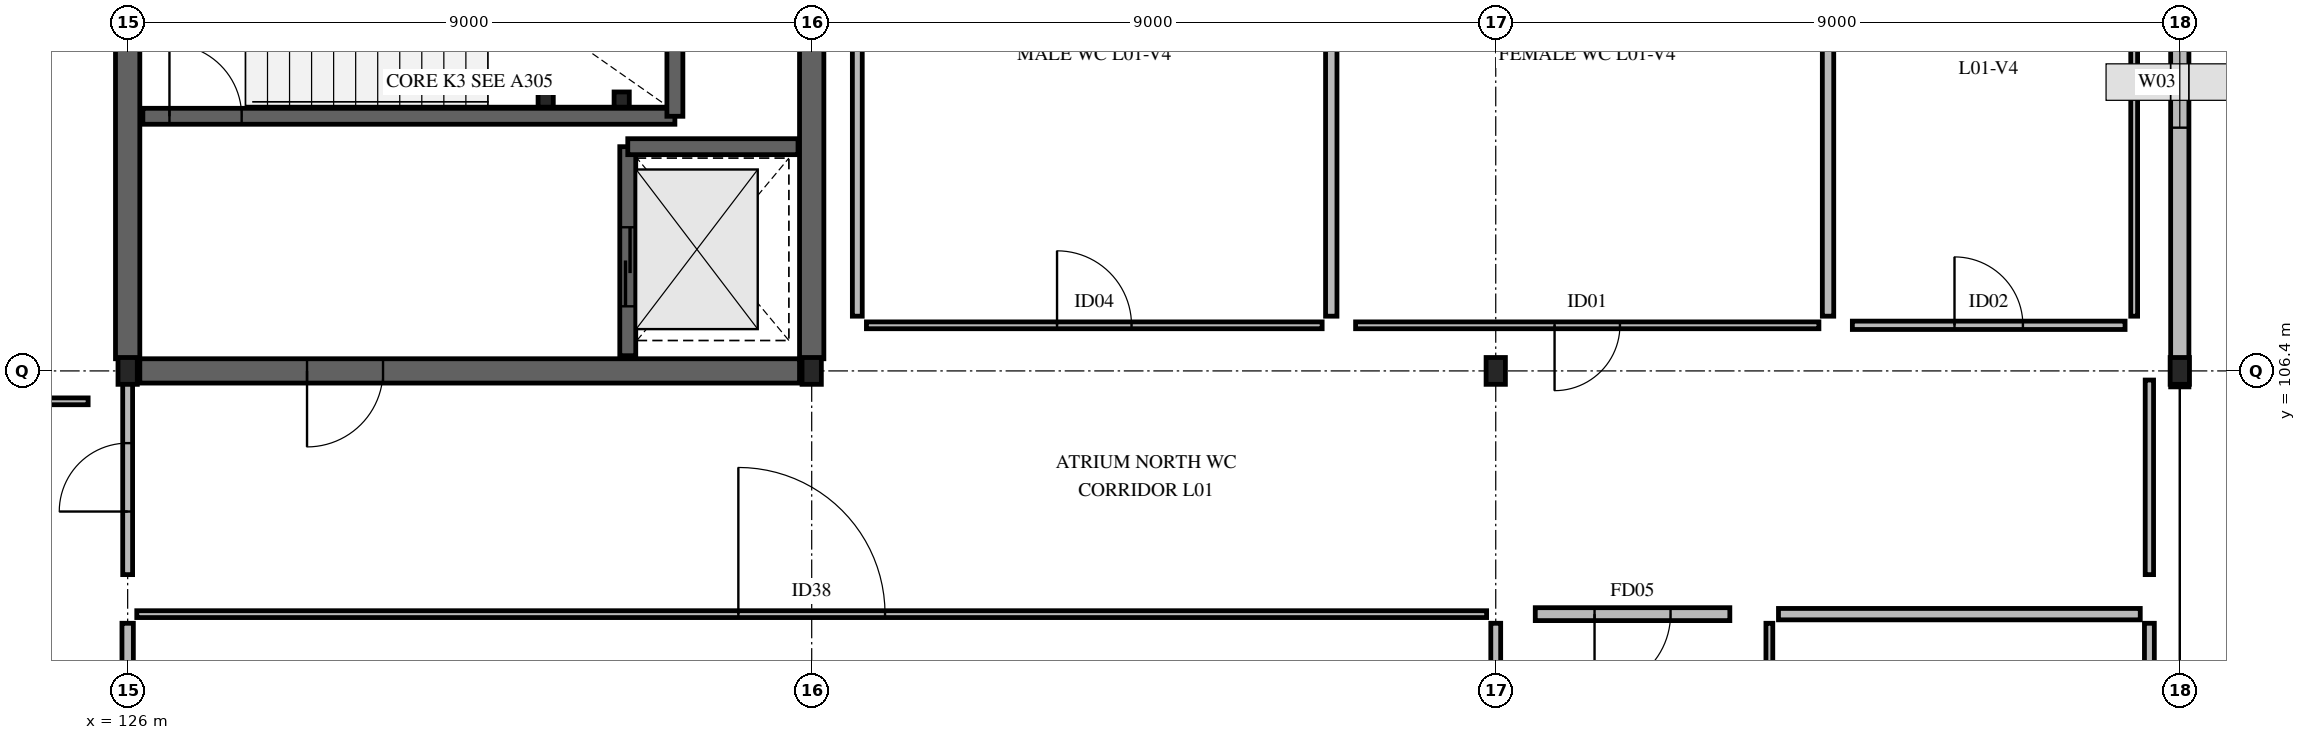
"""IFC4 building model, lengths in metres.
Left out: names, types, materials, properties, quantities, classifications, styles, units other than length and angle.
Written with IfcOpenShell. Run it as: python <this file> out.ifc"""

import sys

from ifc_helpers import new_model, si_unit, direction, frame, frame_2d, origin, origin_2d, place, context, subcontext, project, spatial, rectangle, hollow_rectangle, i_section, extrude, element, fill, save


model = new_model("IFC4")
c1 = context("Model", 3, precision=1e-05, world=origin(), true_north=direction((0.0, 1.0)))
c2 = subcontext(c1, "Body", "Model", "MODEL_VIEW")
j1 = project(units=[si_unit("LENGTHUNIT", "METRE"), si_unit("PLANEANGLEUNIT", "RADIAN")], contexts=[c1])
p1 = place(None, origin())
s1 = spatial("IfcSite", under=j1, at=p1, CompositionType="ELEMENT")
p2 = place(p1, origin())
s2 = spatial("IfcBuilding", under=s1, at=p2, CompositionType="ELEMENT")
p3 = place(p2, frame((0.0, 0.0, 5.04)))
s3 = spatial("IfcBuildingStorey", under=s2, at=p3, CompositionType="ELEMENT", Elevation=5.04)
for number, where, z_axis, x_axis in (
    (1, (126.0, 106.4, 0.0), (0.0, 0.0, 1.0), (1.0, 0.0, 0.0)),
    (2, (135.0, 106.4, 0.0), (0.0, 0.0, 1.0), (1.0, 0.0, 0.0)),
    (3, (144.0, 106.4, 0.0), (0.0, 0.0, 1.0), (1.0, 0.0, 0.0)),
    (4, (153.0, 106.4, 0.0), (0.0, 0.0, 1.0), (1.0, 0.0, 0.0)),
):
    element("IfcColumn", number, at=place(p3, frame(where, z_axis=z_axis, x_axis=x_axis)), inside=s3, PredefinedType="COLUMN", context=c2, shape_type="SweptSolid", body=[
        extrude(i_section(OverallWidth=0.254, OverallDepth=0.353, WebThickness=0.01, FlangeThickness=0.016, FilletRadius=0.015, at=origin_2d()), origin(), (0.0, 0.0, 1.0), 4.32),
    ])
p4 = place(p3, frame((153.0, 106.19, 0.0), z_axis=(0.0, 0.0, 1.0), x_axis=(0.0, 1.0, 0.0)))
e5 = element("IfcWall", 5, at=p4, inside=s3, PredefinedType="STANDARD", context=c2, shape_type="SweptSolid", body=[
    extrude(rectangle(XDim=7.81, YDim=0.24, at=frame_2d((3.905, 0.0))), origin(), (0.0, 0.0, 1.0), 3.788),
])
p5 = place(p4, frame((3.41, 0.0, 0.85)))
e6 = element("IfcOpeningElement", 6, at=p5, cuts=e5, PredefinedType="OPENING", context=c2, shape_type="SweptSolid", body=[
    extrude(rectangle(XDim=1.2, YDim=1.2, at=frame_2d((0.6, 0.6))), frame((0.0, 0.13, 0.0), z_axis=(0.0, -1.0, 0.0), x_axis=(1.0, 0.0, 0.0)), (0.0, 0.0, 1.0), 0.26),
])
p6 = place(p3, frame((126.16, 106.4, 0.0), z_axis=(0.0, 0.0, 1.0), x_axis=(1.0, 0.0, 0.0)))
e7 = element("IfcWall", 7, at=p6, inside=s3, PredefinedType="SHEAR", context=c2, shape_type="SweptSolid", body=[
    extrude(rectangle(XDim=8.68, YDim=0.32, at=frame_2d((4.34, 0.0))), origin(), (0.0, 0.0, 1.0), 4.04),
])
p7 = place(p6, frame((2.2, 0.0, 0.0)))
e8 = element("IfcOpeningElement", 8, at=p7, cuts=e7, PredefinedType="OPENING", context=c2, shape_type="SweptSolid", body=[
    extrude(rectangle(XDim=1.0, YDim=2.15, at=frame_2d((0.5, 1.075))), frame((0.0, 0.17, 0.0), z_axis=(0.0, -1.0, 0.0), x_axis=(1.0, 0.0, 0.0)), (0.0, 0.0, 1.0), 0.34),
])
for number, where, z_axis, x_axis in (
    (9, (126.0, 106.56, 0.0), (0.0, 0.0, 1.0), (0.0, 1.0, 0.0)),
    (10, (135.0, 106.56, 0.0), (0.0, 0.0, 1.0), (0.0, 1.0, 0.0)),
):
    element("IfcWall", number, at=place(p3, frame(where, z_axis=z_axis, x_axis=x_axis)), inside=s3, PredefinedType="SHEAR", context=c2, shape_type="SweptSolid", body=[
        extrude(rectangle(XDim=7.28, YDim=0.32, at=frame_2d((3.64, 0.0))), origin(), (0.0, 0.0, 1.0), 4.04),
    ])
p8 = place(p3, frame((126.2, 109.75, 0.0), z_axis=(0.0, 0.0, 1.0), x_axis=(1.0, 0.0, 0.0)))
e11 = element("IfcWall", 11, at=p8, inside=s3, PredefinedType="SOLIDWALL", context=c2, shape_type="SweptSolid", body=[
    extrude(rectangle(XDim=7.0, YDim=0.21, at=frame_2d((3.5, 0.0))), origin(), (0.0, 0.0, 1.0), 4.04),
])
p9 = place(p8, frame((0.35, 0.0, 0.0)))
e12 = element("IfcOpeningElement", 12, at=p9, cuts=e11, PredefinedType="OPENING", context=c2, shape_type="SweptSolid", body=[
    extrude(rectangle(XDim=0.95, YDim=2.12, at=frame_2d((0.475, 1.06))), frame((0.0, 0.115, 0.0), z_axis=(0.0, -1.0, 0.0), x_axis=(1.0, 0.0, 0.0)), (0.0, 0.0, 1.0), 0.23),
])
p10 = place(p3, frame((133.2, 109.75, 0.0), z_axis=(0.0, 0.0, 1.0), x_axis=(0.0, 1.0, 0.0)))
e13 = element("IfcWall", 13, at=p10, inside=s3, PredefinedType="SOLIDWALL", context=c2, shape_type="SweptSolid", body=[
    extrude(rectangle(XDim=4.05, YDim=0.21, at=frame_2d((2.025, 0.0))), origin(), (0.0, 0.0, 1.0), 4.04),
])
p11 = place(p3, frame((132.58, 106.6, 0.0), z_axis=(0.0, 0.0, 1.0), x_axis=(0.0, 1.0, 0.0)))
e14 = element("IfcWall", 14, at=p11, inside=s3, PredefinedType="SOLIDWALL", context=c2, shape_type="SweptSolid", body=[
    extrude(rectangle(XDim=2.75, YDim=0.21, at=frame_2d((1.375, 0.0))), origin(), (0.0, 0.0, 1.0), 4.04),
])
p12 = place(p11, frame((0.65, 0.0, 0.0)))
e15 = element("IfcOpeningElement", 15, at=p12, cuts=e14, PredefinedType="OPENING", context=c2, shape_type="SweptSolid", body=[
    extrude(rectangle(XDim=1.04, YDim=2.1, at=frame_2d((0.52, 1.05))), frame((0.0, 0.115, 0.0), z_axis=(0.0, -1.0, 0.0), x_axis=(1.0, 0.0, 0.0)), (0.0, 0.0, 1.0), 0.23),
])
p13 = place(p3, frame((132.58, 109.35, 0.0), z_axis=(0.0, 0.0, 1.0), x_axis=(1.0, 0.0, 0.0)))
e16 = element("IfcWall", 16, at=p13, inside=s3, PredefinedType="SOLIDWALL", context=c2, shape_type="SweptSolid", body=[
    extrude(rectangle(XDim=2.24, YDim=0.21, at=frame_2d((1.12, 0.0))), origin(), (0.0, 0.0, 1.0), 4.04),
])
for number, where, z_axis, x_axis in (
    (17, (131.5, 109.97, 0.0), (0.0, 0.0, 1.0), (1.0, 0.0, 0.0)),
    (18, (132.5, 109.97, 0.0), (0.0, 0.0, 1.0), (1.0, 0.0, 0.0)),
):
    element("IfcColumn", number, at=place(p3, frame(where, z_axis=z_axis, x_axis=x_axis)), inside=s3, PredefinedType="COLUMN", context=c2, shape_type="SweptSolid", body=[
        extrude(hollow_rectangle(XDim=0.2, YDim=0.2, WallThickness=0.012, at=origin_2d()), origin(), (0.0, 0.0, 1.0), 4.32),
    ])
p14 = place(p3, frame((144.52, 103.2, 0.0), z_axis=(0.0, 0.0, 1.0), x_axis=(1.0, 0.0, 0.0)))
e19 = element("IfcWall", 19, at=p14, inside=s3, PredefinedType="PARTITIONING", context=c2, shape_type="SweptSolid", body=[
    extrude(rectangle(XDim=2.56, YDim=0.17, at=frame_2d((1.28, 0.0))), origin(), (0.0, 0.0, 1.0), 4.04),
])
p15 = place(p14, frame((0.78, 0.0, 0.0)))
e20 = element("IfcOpeningElement", 20, at=p15, cuts=e19, PredefinedType="OPENING", context=c2, shape_type="SweptSolid", body=[
    extrude(rectangle(XDim=1.0, YDim=2.15, at=frame_2d((0.5, 1.075))), frame((0.0, 0.095, 0.0), z_axis=(0.0, -1.0, 0.0), x_axis=(1.0, 0.0, 0.0)), (0.0, 0.0, 1.0), 0.19),
])
p16 = place(p3, frame((126.12, 103.2, 0.0), z_axis=(0.0, 0.0, 1.0), x_axis=(1.0, 0.0, 0.0)))
e21 = element("IfcWall", 21, at=p16, inside=s3, PredefinedType="PARTITIONING", context=c2, shape_type="SweptSolid", body=[
    extrude(rectangle(XDim=17.76, YDim=0.09, at=frame_2d((8.88, 0.0))), origin(), (0.0, 0.0, 1.0), 4.04),
])
p17 = place(p16, frame((7.915, 0.0, 0.0)))
e22 = element("IfcOpeningElement", 22, at=p17, cuts=e21, PredefinedType="OPENING", context=c2, shape_type="SweptSolid", body=[
    extrude(rectangle(XDim=1.93, YDim=2.15, at=frame_2d((0.965, 1.075))), frame((0.0, 0.055, 0.0), z_axis=(0.0, -1.0, 0.0), x_axis=(1.0, 0.0, 0.0)), (0.0, 0.0, 1.0), 0.11),
])
p18 = place(p3, frame((126.0, 91.72, 0.0), z_axis=(0.0, 0.0, 1.0), x_axis=(0.0, 1.0, 0.0)))
e23 = element("IfcWall", 23, at=p18, inside=s3, PredefinedType="PARTITIONING", context=c2, shape_type="SweptSolid", body=[
    extrude(rectangle(XDim=11.36, YDim=0.15, at=frame_2d((5.68, 0.0))), origin(), (0.0, 0.0, 1.0), 3.631),
])
p19 = place(p18, frame((3.84, 0.0, 0.0)))
e24 = element("IfcOpeningElement", 24, at=p19, cuts=e23, PredefinedType="OPENING", context=c2, shape_type="SweptSolid", body=[
    extrude(rectangle(XDim=1.0, YDim=2.15, at=frame_2d((0.5, 1.075))), frame((0.0, 0.085, 0.0), z_axis=(0.0, -1.0, 0.0), x_axis=(1.0, 0.0, 0.0)), (0.0, 0.0, 1.0), 0.17),
])
p20 = place(p3, frame((144.0, 91.72, 0.0), z_axis=(0.0, 0.0, 1.0), x_axis=(0.0, 1.0, 0.0)))
e25 = element("IfcWall", 25, at=p20, inside=s3, PredefinedType="PARTITIONING", context=c2, shape_type="SweptSolid", body=[
    extrude(rectangle(XDim=11.36, YDim=0.13, at=frame_2d((5.68, 0.0))), origin(), (0.0, 0.0, 1.0), 3.631),
])
p21 = place(p3, frame((147.6, 61.32, 0.0), z_axis=(0.0, 0.0, 1.0), x_axis=(0.0, 1.0, 0.0)))
e26 = element("IfcWall", 26, at=p21, inside=s3, PredefinedType="PARTITIONING", context=c2, shape_type="SweptSolid", body=[
    extrude(rectangle(XDim=41.76, YDim=0.09, at=frame_2d((20.88, 0.0))), origin(), (0.0, 0.0, 1.0), 4.04),
])
p22 = place(p21, frame((19.865, 0.0, 0.0)))
e27 = element("IfcOpeningElement", 27, at=p22, cuts=e26, PredefinedType="OPENING", context=c2, shape_type="SweptSolid", body=[
    extrude(rectangle(XDim=2.03, YDim=2.15, at=frame_2d((1.015, 1.075))), frame((0.0, 0.055, 0.0), z_axis=(0.0, -1.0, 0.0), x_axis=(1.0, 0.0, 0.0)), (0.0, 0.0, 1.0), 0.11),
])
p23 = place(p21, frame((17.34, 0.0, 0.0)))
e28 = element("IfcOpeningElement", 28, at=p23, cuts=e26, PredefinedType="OPENING", context=c2, shape_type="SweptSolid", body=[
    extrude(rectangle(XDim=2.28, YDim=2.2, at=frame_2d((1.14, 1.1))), frame((0.0, 0.055, 0.0), z_axis=(0.0, -1.0, 0.0), x_axis=(1.0, 0.0, 0.0)), (0.0, 0.0, 1.0), 0.11),
])
p24 = place(p3, frame((147.72, 103.2, 0.0), z_axis=(0.0, 0.0, 1.0), x_axis=(1.0, 0.0, 0.0)))
e29 = element("IfcWall", 29, at=p24, inside=s3, PredefinedType="PARTITIONING", context=c2, shape_type="SweptSolid", body=[
    extrude(rectangle(XDim=4.76, YDim=0.15, at=frame_2d((2.38, 0.0))), origin(), (0.0, 0.0, 1.0), 4.04),
])
p25 = place(p3, frame((152.6, 61.32, 0.0), z_axis=(0.0, 0.0, 1.0), x_axis=(0.0, 1.0, 0.0)))
e30 = element("IfcWall", 30, at=p25, inside=s3, PredefinedType="PARTITIONING", context=c2, shape_type="SweptSolid", body=[
    extrude(rectangle(XDim=41.76, YDim=0.13, at=frame_2d((20.88, 0.0))), origin(), (0.0, 0.0, 1.0), 4.04),
])
p26 = place(p3, frame((135.72, 107.0, 0.0), z_axis=(0.0, 0.0, 1.0), x_axis=(1.0, 0.0, 0.0)))
e31 = element("IfcWall", 31, at=p26, inside=s3, PredefinedType="PARTITIONING", context=c2, shape_type="SweptSolid", body=[
    extrude(rectangle(XDim=5.996, YDim=0.09, at=frame_2d((2.998, 0.0))), origin(), (0.0, 0.0, 1.0), 4.04),
])
p27 = place(p26, frame((2.508, 0.0, 0.0)))
e32 = element("IfcOpeningElement", 32, at=p27, cuts=e31, PredefinedType="OPENING", context=c2, shape_type="SweptSolid", body=[
    extrude(rectangle(XDim=0.98, YDim=2.06, at=frame_2d((0.49, 1.03))), frame((0.0, 0.055, 0.0), z_axis=(0.0, -1.0, 0.0), x_axis=(1.0, 0.0, 0.0)), (0.0, 0.0, 1.0), 0.11),
])
p28 = place(p3, frame((141.836, 107.12, 0.0), z_axis=(0.0, 0.0, 1.0), x_axis=(0.0, 1.0, 0.0)))
e33 = element("IfcWall", 33, at=p28, inside=s3, PredefinedType="PARTITIONING", context=c2, shape_type="SweptSolid", body=[
    extrude(rectangle(XDim=6.16, YDim=0.15, at=frame_2d((3.08, 0.0))), origin(), (0.0, 0.0, 1.0), 4.04),
])
p29 = place(p3, frame((135.6, 107.12, 0.0), z_axis=(0.0, 0.0, 1.0), x_axis=(0.0, 1.0, 0.0)))
e34 = element("IfcWall", 34, at=p29, inside=s3, PredefinedType="PARTITIONING", context=c2, shape_type="SweptSolid", body=[
    extrude(rectangle(XDim=6.16, YDim=0.13, at=frame_2d((3.08, 0.0))), origin(), (0.0, 0.0, 1.0), 4.04),
])
p30 = place(p3, frame((142.156, 107.0, 0.0), z_axis=(0.0, 0.0, 1.0), x_axis=(1.0, 0.0, 0.0)))
e35 = element("IfcWall", 35, at=p30, inside=s3, PredefinedType="PARTITIONING", context=c2, shape_type="SweptSolid", body=[
    extrude(rectangle(XDim=6.096, YDim=0.09, at=frame_2d((3.048, 0.0))), origin(), (0.0, 0.0, 1.0), 4.04),
])
p31 = place(p30, frame((2.618, 0.0, 0.0)))
e36 = element("IfcOpeningElement", 36, at=p31, cuts=e35, PredefinedType="OPENING", context=c2, shape_type="SweptSolid", body=[
    extrude(rectangle(XDim=0.86, YDim=2.06, at=frame_2d((0.43, 1.03))), frame((0.0, 0.055, 0.0), z_axis=(0.0, -1.0, 0.0), x_axis=(1.0, 0.0, 0.0)), (0.0, 0.0, 1.0), 0.11),
])
p32 = place(p3, frame((148.372, 107.12, 0.0), z_axis=(0.0, 0.0, 1.0), x_axis=(0.0, 1.0, 0.0)))
e37 = element("IfcWall", 37, at=p32, inside=s3, PredefinedType="PARTITIONING", context=c2, shape_type="SweptSolid", body=[
    extrude(rectangle(XDim=6.16, YDim=0.15, at=frame_2d((3.08, 0.0))), origin(), (0.0, 0.0, 1.0), 4.04),
])
p33 = place(p3, frame((148.692, 107.0, 0.0), z_axis=(0.0, 0.0, 1.0), x_axis=(1.0, 0.0, 0.0)))
e38 = element("IfcWall", 38, at=p33, inside=s3, PredefinedType="PARTITIONING", context=c2, shape_type="SweptSolid", body=[
    extrude(rectangle(XDim=3.588, YDim=0.11, at=frame_2d((1.794, 0.0))), origin(), (0.0, 0.0, 1.0), 4.04),
])
p34 = place(p33, frame((1.344, 0.0, 0.0)))
e39 = element("IfcOpeningElement", 39, at=p34, cuts=e38, PredefinedType="OPENING", context=c2, shape_type="SweptSolid", body=[
    extrude(rectangle(XDim=0.9, YDim=2.06, at=frame_2d((0.45, 1.03))), frame((0.0, 0.065, 0.0), z_axis=(0.0, -1.0, 0.0), x_axis=(1.0, 0.0, 0.0)), (0.0, 0.0, 1.0), 0.13),
])
p35 = place(p3, frame((152.4, 107.12, 0.0), z_axis=(0.0, 0.0, 1.0), x_axis=(0.0, 1.0, 0.0)))
e40 = element("IfcWall", 40, at=p35, inside=s3, PredefinedType="PARTITIONING", context=c2, shape_type="SweptSolid", body=[
    extrude(rectangle(XDim=6.16, YDim=0.09, at=frame_2d((3.08, 0.0))), origin(), (0.0, 0.0, 1.0), 4.04),
])
p36 = place(p3, frame((115.12, 106.0, 0.0), z_axis=(0.0, 0.0, 1.0), x_axis=(1.0, 0.0, 0.0)))
e41 = element("IfcWall", 41, at=p36, inside=s3, PredefinedType="PARTITIONING", context=c2, shape_type="SweptSolid", body=[
    extrude(rectangle(XDim=10.36, YDim=0.09, at=frame_2d((5.18, 0.0))), origin(), (0.0, 0.0, 1.0), 4.04),
])
p37 = place(p3, frame((126.0, 103.72, 0.0), z_axis=(0.0, 0.0, 1.0), x_axis=(0.0, 1.0, 0.0)))
e42 = element("IfcWall", 42, at=p37, inside=s3, PredefinedType="PARTITIONING", context=c2, shape_type="SweptSolid", body=[
    extrude(rectangle(XDim=2.56, YDim=0.13, at=frame_2d((1.28, 0.0))), origin(), (0.0, 0.0, 1.0), 3.631),
])
p38 = place(p37, frame((0.83, 0.0, 0.0)))
e43 = element("IfcOpeningElement", 43, at=p38, cuts=e42, PredefinedType="OPENING", context=c2, shape_type="SweptSolid", body=[
    extrude(rectangle(XDim=0.9, YDim=2.06, at=frame_2d((0.45, 1.03))), frame((0.0, 0.075, 0.0), z_axis=(0.0, -1.0, 0.0), x_axis=(1.0, 0.0, 0.0)), (0.0, 0.0, 1.0), 0.15),
])
p39 = place(p3, frame((152.6, 103.72, 0.0), z_axis=(0.0, 0.0, 1.0), x_axis=(0.0, 1.0, 0.0)))
e44 = element("IfcWall", 44, at=p39, inside=s3, PredefinedType="PARTITIONING", context=c2, shape_type="SweptSolid", body=[
    extrude(rectangle(XDim=2.56, YDim=0.11, at=frame_2d((1.28, 0.0))), origin(), (0.0, 0.0, 1.0), 4.04),
])
p40 = place(p5, origin())
e45 = element("IfcWindow", 45, at=p40, inside=s3, PartitioningType="SINGLE_PANEL", PredefinedType="WINDOW", context=c2, shape_type="SweptSolid", body=[
    extrude(rectangle(XDim=1.2, YDim=1.2, at=frame_2d((0.6, 0.6))), frame((0.0, 0.03, 0.0), z_axis=(0.0, -1.0, 0.0), x_axis=(1.0, 0.0, 0.0)), (0.0, 0.0, 1.0), 0.06),
])
fill(e6, e45)
p41 = place(p9, origin())
e46 = element("IfcDoor", 46, at=p41, inside=s3, OperationType="SINGLE_SWING_LEFT", PredefinedType="DOOR", context=c2, shape_type="SweptSolid", body=[
    extrude(rectangle(XDim=0.95, YDim=2.12, at=frame_2d((0.475, 1.06))), frame((0.0, 0.025, 0.0), z_axis=(0.0, -1.0, 0.0), x_axis=(1.0, 0.0, 0.0)), (0.0, 0.0, 1.0), 0.05),
])
fill(e12, e46)
p42 = place(p12, origin())
e47 = element("IfcDoor", 47, at=p42, inside=s3, OperationType="SLIDING_TO_LEFT", PredefinedType="DOOR", context=c2, shape_type="SweptSolid", body=[
    extrude(rectangle(XDim=1.04, YDim=2.1, at=frame_2d((0.52, 1.05))), frame((0.0, 0.025, 0.0), z_axis=(0.0, -1.0, 0.0), x_axis=(1.0, 0.0, 0.0)), (0.0, 0.0, 1.0), 0.05),
])
fill(e15, e47)
p43 = place(p7, origin())
e48 = element("IfcDoor", 48, at=p43, inside=s3, OperationType="SINGLE_SWING_RIGHT", PredefinedType="DOOR", context=c2, shape_type="SweptSolid", body=[
    extrude(rectangle(XDim=1.0, YDim=2.15, at=frame_2d((0.5, 1.075))), frame((0.0, 0.025, 0.0), z_axis=(0.0, -1.0, 0.0), x_axis=(1.0, 0.0, 0.0)), (0.0, 0.0, 1.0), 0.05),
])
fill(e8, e48)
p44 = place(p15, origin())
e49 = element("IfcDoor", 49, at=p44, inside=s3, OperationType="SINGLE_SWING_RIGHT", PredefinedType="DOOR", context=c2, shape_type="SweptSolid", body=[
    extrude(rectangle(XDim=1.0, YDim=2.15, at=frame_2d((0.5, 1.075))), frame((0.0, 0.025, 0.0), z_axis=(0.0, -1.0, 0.0), x_axis=(1.0, 0.0, 0.0)), (0.0, 0.0, 1.0), 0.05),
])
fill(e20, e49)
p45 = place(p17, origin())
e50 = element("IfcDoor", 50, at=p45, inside=s3, OperationType="SINGLE_SWING_LEFT", PredefinedType="DOOR", context=c2, shape_type="SweptSolid", body=[
    extrude(rectangle(XDim=1.93, YDim=2.15, at=frame_2d((0.965, 1.075))), frame((0.0, 0.025, 0.0), z_axis=(0.0, -1.0, 0.0), x_axis=(1.0, 0.0, 0.0)), (0.0, 0.0, 1.0), 0.05),
])
fill(e22, e50)
p46 = place(p27, origin())
e51 = element("IfcDoor", 51, at=p46, inside=s3, OperationType="SINGLE_SWING_LEFT", PredefinedType="DOOR", context=c2, shape_type="SweptSolid", body=[
    extrude(rectangle(XDim=0.98, YDim=2.06, at=frame_2d((0.49, 1.03))), frame((0.0, 0.025, 0.0), z_axis=(0.0, -1.0, 0.0), x_axis=(1.0, 0.0, 0.0)), (0.0, 0.0, 1.0), 0.05),
])
fill(e32, e51)
p47 = place(p31, origin())
e52 = element("IfcDoor", 52, at=p47, inside=s3, OperationType="SINGLE_SWING_RIGHT", PredefinedType="DOOR", context=c2, shape_type="SweptSolid", body=[
    extrude(rectangle(XDim=0.86, YDim=2.06, at=frame_2d((0.43, 1.03))), frame((0.0, 0.025, 0.0), z_axis=(0.0, -1.0, 0.0), x_axis=(1.0, 0.0, 0.0)), (0.0, 0.0, 1.0), 0.05),
])
fill(e36, e52)
p48 = place(p34, origin())
e53 = element("IfcDoor", 53, at=p48, inside=s3, OperationType="SINGLE_SWING_LEFT", PredefinedType="DOOR", context=c2, shape_type="SweptSolid", body=[
    extrude(rectangle(XDim=0.9, YDim=2.06, at=frame_2d((0.45, 1.03))), frame((0.0, 0.025, 0.0), z_axis=(0.0, -1.0, 0.0), x_axis=(1.0, 0.0, 0.0)), (0.0, 0.0, 1.0), 0.05),
])
fill(e39, e53)
p49 = place(p38, origin())
e54 = element("IfcDoor", 54, at=p49, inside=s3, OperationType="SINGLE_SWING_LEFT", PredefinedType="DOOR", context=c2, shape_type="SweptSolid", body=[
    extrude(rectangle(XDim=0.9, YDim=2.06, at=frame_2d((0.45, 1.03))), frame((0.0, 0.025, 0.0), z_axis=(0.0, -1.0, 0.0), x_axis=(1.0, 0.0, 0.0)), (0.0, 0.0, 1.0), 0.05),
])
fill(e43, e54)
save(model, sys.argv[1])
